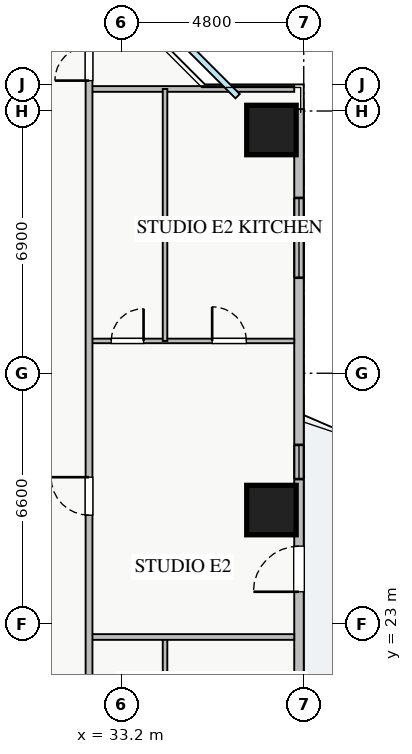
"""IFC4 building model, lengths in metres.
Left out: names, types, materials, properties, quantities, classifications, styles, units other than length and angle.
Written with IfcOpenShell. Run it as: python <this file> out.ifc"""

import sys

from ifc_helpers import new_model, si_unit, direction, frame, frame_2d, origin, origin_2d, place, context, subcontext, project, spatial, rectangle, extrude, source, transform, mapped, element, fill, save


model = new_model("IFC4")
c1 = context("Model", 3, precision=1e-05, world=origin(), true_north=direction((0.0, 1.0)))
c2 = subcontext(c1, "Body", "Model", "MODEL_VIEW")
j1 = project(units=[si_unit("LENGTHUNIT", "METRE"), si_unit("PLANEANGLEUNIT", "RADIAN")], contexts=[c1])
p1 = place(None, origin())
s1 = spatial("IfcSite", under=j1, at=p1, CompositionType="ELEMENT")
p2 = place(p1, origin())
s2 = spatial("IfcBuilding", under=s1, at=p2, CompositionType="ELEMENT")
p3 = place(p2, frame((0.0, 0.0, 86.0)))
s3 = spatial("IfcBuildingStorey", under=s2, at=p3, CompositionType="ELEMENT", Elevation=86.0)
m1 = source(origin(), c2, "Body", "SweptSolid", [
    extrude(rectangle(XDim=1.3, YDim=1.3, at=origin_2d()), origin(), (0.0, 0.0, 1.0), 3.25),
])
for number, where, z_axis, x_axis in (
    (1, (37.15, 26.0, 0.0), (0.0, 0.0, 1.0), (1.0, 0.0, 0.0)),
    (2, (37.15, 36.0, 0.0), (0.0, 0.0, 1.0), (1.0, 0.0, 0.0)),
):
    element("IfcColumn", number, at=place(p3, frame(where, z_axis=z_axis, x_axis=x_axis)), inside=s3, PredefinedType="COLUMN", context=c2, shape_type="MappedRepresentation", body=[
        mapped(m1, transform((0.0, 0.0, 0.0), x_axis=(1.0, 0.0, 0.0), y_axis=(0.0, 1.0, 0.0), z_axis=(0.0, 0.0, 1.0), scale=1.0)),
    ])
p4 = place(p3, frame((37.875, 9.45, 0.0), z_axis=(0.0, 0.0, 1.0), x_axis=(0.0, 1.0, 0.0)))
e3 = element("IfcWall", 3, at=p4, inside=s3, PredefinedType="STANDARD", context=c2, shape_type="SweptSolid", body=[
    extrude(rectangle(XDim=27.1, YDim=0.25, at=frame_2d((13.55, 0.0))), origin(), (0.0, 0.0, 1.0), 2.61),
])
p5 = place(p4, frame((14.4, 0.0, 0.0)))
e4 = element("IfcOpeningElement", 4, at=p5, cuts=e3, PredefinedType="OPENING", context=c2, shape_type="SweptSolid", body=[
    extrude(rectangle(XDim=1.2, YDim=2.1, at=frame_2d((0.6, 1.05))), frame((0.0, 0.135, 0.0), z_axis=(0.0, -1.0, 0.0), x_axis=(1.0, 0.0, 0.0)), (0.0, 0.0, 1.0), 0.27),
])
p6 = place(p4, frame((2.188, 0.0, 0.9)))
e5 = element("IfcOpeningElement", 5, at=p6, cuts=e3, PredefinedType="OPENING", context=c2, shape_type="SweptSolid", body=[
    extrude(rectangle(XDim=2.4, YDim=1.48, at=frame_2d((1.2, 0.74))), frame((0.0, 0.135, 0.0), z_axis=(0.0, -1.0, 0.0), x_axis=(1.0, 0.0, 0.0)), (0.0, 0.0, 1.0), 0.27),
])
p7 = place(p4, frame((22.663, 0.0, 0.9)))
e6 = element("IfcOpeningElement", 6, at=p7, cuts=e3, PredefinedType="OPENING", context=c2, shape_type="SweptSolid", body=[
    extrude(rectangle(XDim=2.1, YDim=1.48, at=frame_2d((1.05, 0.74))), frame((0.0, 0.135, 0.0), z_axis=(0.0, -1.0, 0.0), x_axis=(1.0, 0.0, 0.0)), (0.0, 0.0, 1.0), 0.27),
])
p8 = place(p4, frame((17.365, 0.0, 0.9)))
e7 = element("IfcOpeningElement", 7, at=p8, cuts=e3, PredefinedType="OPENING", context=c2, shape_type="SweptSolid", body=[
    extrude(rectangle(XDim=0.9, YDim=1.2, at=frame_2d((0.45, 0.6))), frame((0.0, 0.135, 0.0), z_axis=(0.0, -1.0, 0.0), x_axis=(1.0, 0.0, 0.0)), (0.0, 0.0, 1.0), 0.27),
])
p9 = place(p3, frame((32.35, 37.08, 0.0), z_axis=(0.0, 0.0, 1.0), x_axis=(1.0, 0.0, 0.0)))
e8 = element("IfcWall", 8, at=p9, inside=s3, PredefinedType="PARTITIONING", context=c2, shape_type="SweptSolid", body=[
    extrude(rectangle(XDim=5.4, YDim=0.15, at=frame_2d((2.7, 0.0))), origin(), (0.0, 0.0, 1.0), 3.07),
])
p10 = place(p3, frame((34.35, 16.34, 0.0), z_axis=(0.0, 0.0, 1.0), x_axis=(0.0, 1.0, 0.0)))
e9 = element("IfcWall", 9, at=p10, inside=s3, PredefinedType="PLUMBINGWALL", context=c2, shape_type="SweptSolid", body=[
    extrude(rectangle(XDim=6.32, YDim=0.12, at=frame_2d((3.16, 0.0))), origin(), (0.0, 0.0, 1.0), 3.07),
])
p11 = place(p3, frame((32.35, 30.45, 0.0), z_axis=(0.0, 0.0, 1.0), x_axis=(1.0, 0.0, 0.0)))
e10 = element("IfcWall", 10, at=p11, inside=s3, PredefinedType="PLUMBINGWALL", context=c2, shape_type="SweptSolid", body=[
    extrude(rectangle(XDim=5.4, YDim=0.12, at=frame_2d((2.7, 0.0))), origin(), (0.0, 0.0, 1.0), 3.07),
])
p12 = place(p11, frame((0.585, 0.0, 0.0)))
e11 = element("IfcOpeningElement", 11, at=p12, cuts=e10, PredefinedType="OPENING", context=c2, shape_type="SweptSolid", body=[
    extrude(rectangle(XDim=0.85, YDim=2.05, at=frame_2d((0.425, 1.025))), frame((0.0, 0.07, 0.0), z_axis=(0.0, -1.0, 0.0), x_axis=(1.0, 0.0, 0.0)), (0.0, 0.0, 1.0), 0.14),
])
p13 = place(p11, frame((3.24, 0.0, 0.0)))
e12 = element("IfcOpeningElement", 12, at=p13, cuts=e10, PredefinedType="OPENING", context=c2, shape_type="SweptSolid", body=[
    extrude(rectangle(XDim=0.9, YDim=2.05, at=frame_2d((0.45, 1.025))), frame((0.0, 0.07, 0.0), z_axis=(0.0, -1.0, 0.0), x_axis=(1.0, 0.0, 0.0)), (0.0, 0.0, 1.0), 0.14),
])
p14 = place(p3, frame((34.35, 30.45, 0.0), z_axis=(0.0, 0.0, 1.0), x_axis=(0.0, 1.0, 0.0)))
e13 = element("IfcWall", 13, at=p14, inside=s3, PredefinedType="PLUMBINGWALL", context=c2, shape_type="SweptSolid", body=[
    extrude(rectangle(XDim=6.63, YDim=0.12, at=frame_2d((3.315, 0.0))), origin(), (0.0, 0.0, 1.0), 3.07),
])
p15 = place(p3, frame((32.35, 22.66, 0.0), z_axis=(0.0, 0.0, 1.0), x_axis=(1.0, 0.0, 0.0)))
e14 = element("IfcWall", 14, at=p15, inside=s3, PredefinedType="PARTITIONING", context=c2, shape_type="SweptSolid", body=[
    extrude(rectangle(XDim=5.4, YDim=0.15, at=frame_2d((2.7, 0.0))), origin(), (0.0, 0.0, 1.0), 3.07),
])
p16 = place(p3, frame((32.35, 7.21, 0.0), z_axis=(0.0, 0.0, 1.0), x_axis=(0.0, 1.0, 0.0)))
e15 = element("IfcWall", 15, at=p16, inside=s3, PredefinedType="PARTITIONING", context=c2, shape_type="SweptSolid", body=[
    extrude(rectangle(XDim=31.23, YDim=0.18, at=frame_2d((15.615, 0.0))), origin(), (0.0, 0.0, 1.0), 2.715),
])
p17 = place(p16, frame((30.09, 0.0, 0.0)))
e16 = element("IfcOpeningElement", 16, at=p17, cuts=e15, PredefinedType="OPENING", context=c2, shape_type="SweptSolid", body=[
    extrude(rectangle(XDim=0.9, YDim=2.05, at=frame_2d((0.45, 1.025))), frame((0.0, 0.1, 0.0), z_axis=(0.0, -1.0, 0.0), x_axis=(1.0, 0.0, 0.0)), (0.0, 0.0, 1.0), 0.2),
])
p18 = place(p16, frame((0.415, 0.0, 0.0)))
e17 = element("IfcOpeningElement", 17, at=p18, cuts=e15, PredefinedType="OPENING", context=c2, shape_type="SweptSolid", body=[
    extrude(rectangle(XDim=0.9, YDim=2.05, at=frame_2d((0.45, 1.025))), frame((0.0, 0.1, 0.0), z_axis=(0.0, -1.0, 0.0), x_axis=(1.0, 0.0, 0.0)), (0.0, 0.0, 1.0), 0.2),
])
p19 = place(p16, frame((4.73, 0.0, 0.0)))
e18 = element("IfcOpeningElement", 18, at=p19, cuts=e15, PredefinedType="OPENING", context=c2, shape_type="SweptSolid", body=[
    extrude(rectangle(XDim=1.0, YDim=2.05, at=frame_2d((0.5, 1.025))), frame((0.0, 0.1, 0.0), z_axis=(0.0, -1.0, 0.0), x_axis=(1.0, 0.0, 0.0)), (0.0, 0.0, 1.0), 0.2),
])
p20 = place(p16, frame((18.655, 0.0, 0.0)))
e19 = element("IfcOpeningElement", 19, at=p20, cuts=e15, PredefinedType="OPENING", context=c2, shape_type="SweptSolid", body=[
    extrude(rectangle(XDim=1.0, YDim=2.05, at=frame_2d((0.5, 1.025))), frame((0.0, 0.1, 0.0), z_axis=(0.0, -1.0, 0.0), x_axis=(1.0, 0.0, 0.0)), (0.0, 0.0, 1.0), 0.2),
])
m2 = source(origin(), c2, "Body", "SweptSolid", [
    extrude(rectangle(XDim=1.2, YDim=2.1, at=frame_2d((0.6, 1.05))), frame((0.0, 0.025, 0.0), z_axis=(0.0, -1.0, 0.0), x_axis=(1.0, 0.0, 0.0)), (0.0, 0.0, 1.0), 0.05),
])
p21 = place(p5, origin())
e20 = element("IfcDoor", 20, at=p21, inside=s3, OperationType="SINGLE_SWING_LEFT", PredefinedType="DOOR", context=c2, shape_type="MappedRepresentation", body=[
    mapped(m2, transform((0.0, 0.0, 0.0), x_axis=(1.0, 0.0, 0.0), y_axis=(0.0, 1.0, 0.0), z_axis=(0.0, 0.0, 1.0), scale=1.0)),
])
fill(e4, e20)
m3 = source(origin(), c2, "Body", "SweptSolid", [
    extrude(rectangle(XDim=2.1, YDim=1.48, at=frame_2d((1.05, 0.74))), frame((0.0, 0.03, 0.0), z_axis=(0.0, -1.0, 0.0), x_axis=(1.0, 0.0, 0.0)), (0.0, 0.0, 1.0), 0.06),
])
p22 = place(p7, origin())
e21 = element("IfcWindow", 21, at=p22, inside=s3, PartitioningType="TRIPLE_PANEL_VERTICAL", PredefinedType="WINDOW", context=c2, shape_type="MappedRepresentation", body=[
    mapped(m3, transform((0.0, 0.0, 0.0), x_axis=(1.0, 0.0, 0.0), y_axis=(0.0, 1.0, 0.0), z_axis=(0.0, 0.0, 1.0), scale=1.0)),
])
fill(e6, e21)
m4 = source(origin(), c2, "Body", "SweptSolid", [
    extrude(rectangle(XDim=0.85, YDim=2.05, at=frame_2d((0.425, 1.025))), frame((0.0, 0.025, 0.0), z_axis=(0.0, -1.0, 0.0), x_axis=(1.0, 0.0, 0.0)), (0.0, 0.0, 1.0), 0.05),
])
p23 = place(p12, origin())
e22 = element("IfcDoor", 22, at=p23, inside=s3, OperationType="SINGLE_SWING_RIGHT", PredefinedType="DOOR", context=c2, shape_type="MappedRepresentation", body=[
    mapped(m4, transform((0.0, 0.0, 0.0), x_axis=(1.0, 0.0, 0.0), y_axis=(0.0, 1.0, 0.0), z_axis=(0.0, 0.0, 1.0), scale=1.0)),
])
fill(e11, e22)
m5 = source(origin(), c2, "Body", "SweptSolid", [
    extrude(rectangle(XDim=0.9, YDim=2.05, at=frame_2d((0.45, 1.025))), frame((0.0, 0.025, 0.0), z_axis=(0.0, -1.0, 0.0), x_axis=(1.0, 0.0, 0.0)), (0.0, 0.0, 1.0), 0.05),
])
p24 = place(p13, origin())
e23 = element("IfcDoor", 23, at=p24, inside=s3, OperationType="SINGLE_SWING_LEFT", PredefinedType="DOOR", context=c2, shape_type="MappedRepresentation", body=[
    mapped(m5, transform((0.0, 0.0, 0.0), x_axis=(1.0, 0.0, 0.0), y_axis=(0.0, 1.0, 0.0), z_axis=(0.0, 0.0, 1.0), scale=1.0)),
])
fill(e12, e23)
p25 = place(p17, origin())
e24 = element("IfcDoor", 24, at=p25, inside=s3, OperationType="SINGLE_SWING_LEFT", PredefinedType="DOOR", context=c2, shape_type="MappedRepresentation", body=[
    mapped(m5, transform((0.0, 0.0, 0.0), x_axis=(1.0, 0.0, 0.0), y_axis=(0.0, 1.0, 0.0), z_axis=(0.0, 0.0, 1.0), scale=1.0)),
])
fill(e16, e24)
m6 = source(origin(), c2, "Body", "SweptSolid", [
    extrude(rectangle(XDim=1.0, YDim=2.05, at=frame_2d((0.5, 1.025))), frame((0.0, 0.025, 0.0), z_axis=(0.0, -1.0, 0.0), x_axis=(1.0, 0.0, 0.0)), (0.0, 0.0, 1.0), 0.05),
])
p26 = place(p20, origin())
e25 = element("IfcDoor", 25, at=p26, inside=s3, OperationType="SINGLE_SWING_RIGHT", PredefinedType="DOOR", context=c2, shape_type="MappedRepresentation", body=[
    mapped(m6, transform((0.0, 0.0, 0.0), x_axis=(1.0, 0.0, 0.0), y_axis=(0.0, 1.0, 0.0), z_axis=(0.0, 0.0, 1.0), scale=1.0)),
])
fill(e19, e25)
m7 = source(origin(), c2, "Body", "SweptSolid", [
    extrude(rectangle(XDim=0.9, YDim=1.2, at=frame_2d((0.45, 0.6))), frame((0.0, 0.03, 0.0), z_axis=(0.0, -1.0, 0.0), x_axis=(1.0, 0.0, 0.0)), (0.0, 0.0, 1.0), 0.06),
])
p27 = place(p8, origin())
e26 = element("IfcWindow", 26, at=p27, inside=s3, PartitioningType="SINGLE_PANEL", PredefinedType="WINDOW", context=c2, shape_type="MappedRepresentation", body=[
    mapped(m7, transform((0.0, 0.0, 0.0), x_axis=(1.0, 0.0, 0.0), y_axis=(0.0, 1.0, 0.0), z_axis=(0.0, 0.0, 1.0), scale=1.0)),
])
fill(e7, e26)
save(model, sys.argv[1])
